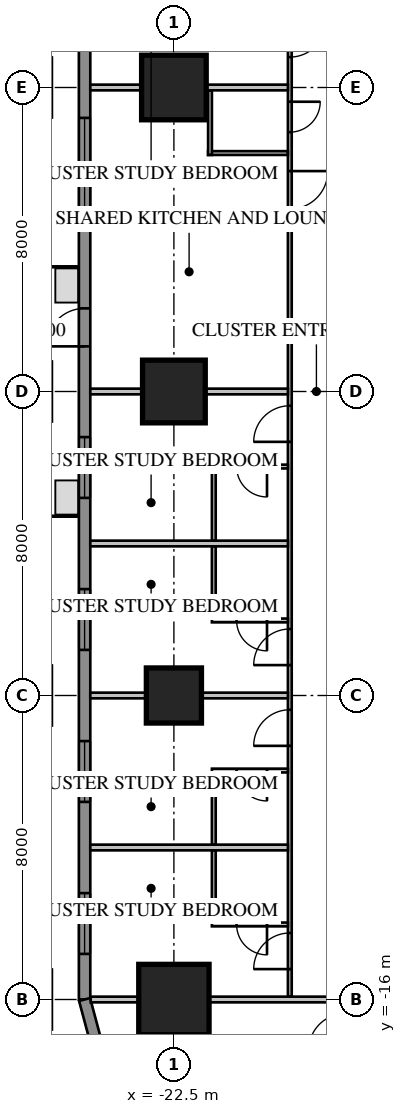
"""IFC4 building model, lengths in metres.
Left out: names, types, materials, properties, quantities, classifications, styles, units other than length and angle.
Written with IfcOpenShell. Run it as: python <this file> out.ifc"""

import sys

from ifc_helpers import new_model, si_unit, direction, frame, frame_2d, origin, origin_2d, place, context, subcontext, project, spatial, rectangle, extrude, element, fill, save


model = new_model("IFC4")
c1 = context("Model", 3, precision=1e-05, world=origin(), true_north=direction((0.0, 1.0)))
c2 = subcontext(c1, "Body", "Model", "MODEL_VIEW")
j1 = project(units=[si_unit("LENGTHUNIT", "METRE"), si_unit("PLANEANGLEUNIT", "RADIAN")], contexts=[c1])
p1 = place(None, origin())
s1 = spatial("IfcSite", under=j1, at=p1, CompositionType="ELEMENT")
p2 = place(p1, origin())
s2 = spatial("IfcBuilding", under=s1, at=p2, CompositionType="ELEMENT")
p3 = place(p2, frame((0.0, 0.0, 31.4)))
s3 = spatial("IfcBuildingStorey", under=s2, at=p3, CompositionType="ELEMENT", Elevation=31.4)
p4 = place(p3, frame((-22.5, 8.0, 0.0), z_axis=(0.0, 0.0, 1.0), x_axis=(1.0, 0.0, 0.0)))
e1 = element("IfcColumn", 1, at=p4, inside=s3, PredefinedType="COLUMN", context=c2, shape_type="SweptSolid", body=[
    extrude(rectangle(XDim=1.7, YDim=1.7, at=origin_2d()), origin(), (0.0, 0.0, 1.0), 3.85),
])
p5 = place(p3, frame((-22.5, 0.0, 0.0), z_axis=(0.0, 0.0, 1.0), x_axis=(1.0, 0.0, 0.0)))
e2 = element("IfcColumn", 2, at=p5, inside=s3, PredefinedType="COLUMN", context=c2, shape_type="SweptSolid", body=[
    extrude(rectangle(XDim=1.65, YDim=1.65, at=origin_2d()), origin(), (0.0, 0.0, 1.0), 3.85),
])
p6 = place(p3, frame((-22.5, -8.0, 0.0), z_axis=(0.0, 0.0, 1.0), x_axis=(1.0, 0.0, 0.0)))
e3 = element("IfcColumn", 3, at=p6, inside=s3, PredefinedType="COLUMN", context=c2, shape_type="SweptSolid", body=[
    extrude(rectangle(XDim=1.45, YDim=1.45, at=origin_2d()), origin(), (0.0, 0.0, 1.0), 3.85),
])
p7 = place(p3, frame((-22.5, -16.0, 0.0), z_axis=(0.0, 0.0, 1.0), x_axis=(1.0, 0.0, 0.0)))
e4 = element("IfcColumn", 4, at=p7, inside=s3, PredefinedType="COLUMN", context=c2, shape_type="SweptSolid", body=[
    extrude(rectangle(XDim=1.85, YDim=1.85, at=origin_2d()), origin(), (0.0, 0.0, 1.0), 3.85),
])
p8 = place(p3, frame((-24.85, 16.0, 0.0), z_axis=(0.0, 0.0, 1.0), x_axis=(0.0, -1.0, 0.0)))
e5 = element("IfcWall", 5, at=p8, inside=s3, PredefinedType="SOLIDWALL", context=c2, shape_type="SweptSolid", body=[
    extrude(rectangle(XDim=32.0, YDim=0.3, at=frame_2d((16.0, 0.0))), origin(), (0.0, 0.0, 1.0), 3.65),
])
p9 = place(p8, frame((1.2, 0.0, 0.75)))
e6 = element("IfcOpeningElement", 6, at=p9, cuts=e5, PredefinedType="OPENING", context=c2, shape_type="SweptSolid", body=[
    extrude(rectangle(XDim=1.6, YDim=1.8, at=frame_2d((0.8, 0.9))), frame((0.0, 0.17, 0.0), z_axis=(0.0, -1.0, 0.0), x_axis=(1.0, 0.0, 0.0)), (0.0, 0.0, 1.0), 0.34),
])
p10 = place(p8, frame((5.2, 0.0, 0.75)))
e7 = element("IfcOpeningElement", 7, at=p10, cuts=e5, PredefinedType="OPENING", context=c2, shape_type="SweptSolid", body=[
    extrude(rectangle(XDim=1.6, YDim=1.8, at=frame_2d((0.8, 0.9))), frame((0.0, 0.17, 0.0), z_axis=(0.0, -1.0, 0.0), x_axis=(1.0, 0.0, 0.0)), (0.0, 0.0, 1.0), 0.34),
])
p11 = place(p8, frame((17.2, 0.0, 0.75)))
e8 = element("IfcOpeningElement", 8, at=p11, cuts=e5, PredefinedType="OPENING", context=c2, shape_type="SweptSolid", body=[
    extrude(rectangle(XDim=1.6, YDim=1.8, at=frame_2d((0.8, 0.9))), frame((0.0, 0.17, 0.0), z_axis=(0.0, -1.0, 0.0), x_axis=(1.0, 0.0, 0.0)), (0.0, 0.0, 1.0), 0.34),
])
p12 = place(p8, frame((21.2, 0.0, 0.75)))
e9 = element("IfcOpeningElement", 9, at=p12, cuts=e5, PredefinedType="OPENING", context=c2, shape_type="SweptSolid", body=[
    extrude(rectangle(XDim=1.6, YDim=1.8, at=frame_2d((0.8, 0.9))), frame((0.0, 0.17, 0.0), z_axis=(0.0, -1.0, 0.0), x_axis=(1.0, 0.0, 0.0)), (0.0, 0.0, 1.0), 0.34),
])
p13 = place(p8, frame((25.2, 0.0, 0.75)))
e10 = element("IfcOpeningElement", 10, at=p13, cuts=e5, PredefinedType="OPENING", context=c2, shape_type="SweptSolid", body=[
    extrude(rectangle(XDim=1.6, YDim=1.8, at=frame_2d((0.8, 0.9))), frame((0.0, 0.17, 0.0), z_axis=(0.0, -1.0, 0.0), x_axis=(1.0, 0.0, 0.0)), (0.0, 0.0, 1.0), 0.34),
])
p14 = place(p8, frame((29.2, 0.0, 0.75)))
e11 = element("IfcOpeningElement", 11, at=p14, cuts=e5, PredefinedType="OPENING", context=c2, shape_type="SweptSolid", body=[
    extrude(rectangle(XDim=1.6, YDim=1.8, at=frame_2d((0.8, 0.9))), frame((0.0, 0.17, 0.0), z_axis=(0.0, -1.0, 0.0), x_axis=(1.0, 0.0, 0.0)), (0.0, 0.0, 1.0), 0.34),
])
p15 = place(p8, frame((8.8, 0.0, 0.75)))
e12 = element("IfcOpeningElement", 12, at=p15, cuts=e5, PredefinedType="OPENING", context=c2, shape_type="SweptSolid", body=[
    extrude(rectangle(XDim=2.4, YDim=1.8, at=frame_2d((1.2, 0.9))), frame((0.0, 0.17, 0.0), z_axis=(0.0, -1.0, 0.0), x_axis=(1.0, 0.0, 0.0)), (0.0, 0.0, 1.0), 0.34),
])
p16 = place(p8, frame((13.812, 0.0, 0.0)))
e13 = element("IfcOpeningElement", 13, at=p16, cuts=e5, PredefinedType="OPENING", context=c2, shape_type="SweptSolid", body=[
    extrude(rectangle(XDim=1.0, YDim=2.4, at=frame_2d((0.5, 1.2))), frame((0.0, 0.17, 0.0), z_axis=(0.0, -1.0, 0.0), x_axis=(1.0, 0.0, 0.0)), (0.0, 0.0, 1.0), 0.34),
])
p17 = place(p3, frame((-24.85, -16.0, 0.0), z_axis=(0.0, 0.0, 1.0), x_axis=(0.258839972501, -0.965920218567, 0.0)))
e14 = element("IfcWall", 14, at=p17, inside=s3, PredefinedType="SOLIDWALL", context=c2, shape_type="SweptSolid", body=[
    extrude(rectangle(XDim=4.581, YDim=0.3, at=frame_2d((2.291, 0.0))), origin(), (0.0, 0.0, 1.0), 3.65),
])
p18 = place(p3, frame((-19.45, 15.925, 0.0), z_axis=(0.0, 0.0, 1.0), x_axis=(0.0, -1.0, 0.0)))
e15 = element("IfcWall", 15, at=p18, inside=s3, PredefinedType="PARTITIONING", context=c2, shape_type="SweptSolid", body=[
    extrude(rectangle(XDim=31.85, YDim=0.1, at=frame_2d((15.925, 0.0))), origin(), (0.0, 0.0, 1.0), 3.65),
])
p19 = place(p18, frame((10.125, 0.0, 0.0)))
e16 = element("IfcOpeningElement", 16, at=p19, cuts=e15, PredefinedType="OPENING", context=c2, shape_type="SweptSolid", body=[
    extrude(rectangle(XDim=1.0, YDim=2.1, at=frame_2d((0.5, 1.05))), frame((0.0, 0.07, 0.0), z_axis=(0.0, -1.0, 0.0), x_axis=(1.0, 0.0, 0.0)), (0.0, 0.0, 1.0), 0.14),
])
p20 = place(p18, frame((8.3, 0.0, 0.0)))
e17 = element("IfcOpeningElement", 17, at=p20, cuts=e15, PredefinedType="OPENING", context=c2, shape_type="SweptSolid", body=[
    extrude(rectangle(XDim=0.8, YDim=2.1, at=frame_2d((0.4, 1.05))), frame((0.0, 0.07, 0.0), z_axis=(0.0, -1.0, 0.0), x_axis=(1.0, 0.0, 0.0)), (0.0, 0.0, 1.0), 0.14),
])
p21 = place(p18, frame((0.3, 0.0, 0.0)))
e18 = element("IfcOpeningElement", 18, at=p21, cuts=e15, PredefinedType="OPENING", context=c2, shape_type="SweptSolid", body=[
    extrude(rectangle(XDim=0.95, YDim=2.1, at=frame_2d((0.475, 1.05))), frame((0.0, 0.07, 0.0), z_axis=(0.0, -1.0, 0.0), x_axis=(1.0, 0.0, 0.0)), (0.0, 0.0, 1.0), 0.14),
])
p22 = place(p18, frame((6.175, 0.0, 0.0)))
e19 = element("IfcOpeningElement", 19, at=p22, cuts=e15, PredefinedType="OPENING", context=c2, shape_type="SweptSolid", body=[
    extrude(rectangle(XDim=0.95, YDim=2.1, at=frame_2d((0.475, 1.05))), frame((0.0, 0.07, 0.0), z_axis=(0.0, -1.0, 0.0), x_axis=(1.0, 0.0, 0.0)), (0.0, 0.0, 1.0), 0.14),
])
p23 = place(p18, frame((16.3, 0.0, 0.0)))
e20 = element("IfcOpeningElement", 20, at=p23, cuts=e15, PredefinedType="OPENING", context=c2, shape_type="SweptSolid", body=[
    extrude(rectangle(XDim=0.95, YDim=2.1, at=frame_2d((0.475, 1.05))), frame((0.0, 0.07, 0.0), z_axis=(0.0, -1.0, 0.0), x_axis=(1.0, 0.0, 0.0)), (0.0, 0.0, 1.0), 0.14),
])
p24 = place(p18, frame((22.175, 0.0, 0.0)))
e21 = element("IfcOpeningElement", 21, at=p24, cuts=e15, PredefinedType="OPENING", context=c2, shape_type="SweptSolid", body=[
    extrude(rectangle(XDim=0.95, YDim=2.1, at=frame_2d((0.475, 1.05))), frame((0.0, 0.07, 0.0), z_axis=(0.0, -1.0, 0.0), x_axis=(1.0, 0.0, 0.0)), (0.0, 0.0, 1.0), 0.14),
])
p25 = place(p18, frame((24.3, 0.0, 0.0)))
e22 = element("IfcOpeningElement", 22, at=p25, cuts=e15, PredefinedType="OPENING", context=c2, shape_type="SweptSolid", body=[
    extrude(rectangle(XDim=0.95, YDim=2.1, at=frame_2d((0.475, 1.05))), frame((0.0, 0.07, 0.0), z_axis=(0.0, -1.0, 0.0), x_axis=(1.0, 0.0, 0.0)), (0.0, 0.0, 1.0), 0.14),
])
p26 = place(p18, frame((30.175, 0.0, 0.0)))
e23 = element("IfcOpeningElement", 23, at=p26, cuts=e15, PredefinedType="OPENING", context=c2, shape_type="SweptSolid", body=[
    extrude(rectangle(XDim=0.95, YDim=2.1, at=frame_2d((0.475, 1.05))), frame((0.0, 0.07, 0.0), z_axis=(0.0, -1.0, 0.0), x_axis=(1.0, 0.0, 0.0)), (0.0, 0.0, 1.0), 0.14),
])
p27 = place(p3, frame((-19.5, 6.275, 0.0), z_axis=(0.0, 0.0, 1.0), x_axis=(-1.0, 0.0, 0.0)))
e24 = element("IfcWall", 24, at=p27, inside=s3, PredefinedType="PARTITIONING", context=c2, shape_type="SweptSolid", body=[
    extrude(rectangle(XDim=2.1, YDim=0.1, at=frame_2d((1.05, 0.0))), origin(), (0.0, 0.0, 1.0), 3.65),
])
p28 = place(p3, frame((-21.55, 7.925, 0.0), z_axis=(0.0, 0.0, 1.0), x_axis=(0.0, -1.0, 0.0)))
e25 = element("IfcWall", 25, at=p28, inside=s3, PredefinedType="PARTITIONING", context=c2, shape_type="SweptSolid", body=[
    extrude(rectangle(XDim=1.7, YDim=0.1, at=frame_2d((0.85, 0.0))), origin(), (0.0, 0.0, 1.0), 3.65),
])
p29 = place(p3, frame((-19.5, 8.0, 0.0), z_axis=(0.0, 0.0, 1.0), x_axis=(-1.0, 0.0, 0.0)))
e26 = element("IfcWall", 26, at=p29, inside=s3, PredefinedType="PARTITIONING", context=c2, shape_type="SweptSolid", body=[
    extrude(rectangle(XDim=5.2, YDim=0.15, at=frame_2d((2.6, 0.0))), origin(), (0.0, 0.0, 1.0), 3.65),
])
p30 = place(p3, frame((-19.5, 0.0, 0.0), z_axis=(0.0, 0.0, 1.0), x_axis=(-1.0, 0.0, 0.0)))
e27 = element("IfcWall", 27, at=p30, inside=s3, PredefinedType="PARTITIONING", context=c2, shape_type="SweptSolid", body=[
    extrude(rectangle(XDim=5.2, YDim=0.15, at=frame_2d((2.6, 0.0))), origin(), (0.0, 0.0, 1.0), 2.957),
])
for number, where, z_axis, x_axis in (
    (28, (-19.5, -4.0, 0.0), (0.0, 0.0, 1.0), (-1.0, 0.0, 0.0)),
    (29, (-19.5, -8.0, 0.0), (0.0, 0.0, 1.0), (-1.0, 0.0, 0.0)),
    (30, (-19.5, -12.0, 0.0), (0.0, 0.0, 1.0), (-1.0, 0.0, 0.0)),
):
    element("IfcWall", number, at=place(p3, frame(where, z_axis=z_axis, x_axis=x_axis)), inside=s3, PredefinedType="PARTITIONING", context=c2, shape_type="SweptSolid", body=[
        extrude(rectangle(XDim=5.2, YDim=0.15, at=frame_2d((2.6, 0.0))), origin(), (0.0, 0.0, 1.0), 3.65),
    ])
p31 = place(p3, frame((-18.1, -16.0, 0.0), z_axis=(0.0, 0.0, 1.0), x_axis=(-1.0, 0.0, 0.0)))
e31 = element("IfcWall", 31, at=p31, inside=s3, PredefinedType="PARTITIONING", context=c2, shape_type="SweptSolid", body=[
    extrude(rectangle(XDim=6.589, YDim=0.15, at=frame_2d((3.295, 0.0))), origin(), (0.0, 0.0, 1.0), 3.65),
])
p32 = place(p3, frame((-19.5, -1.975, 0.0), z_axis=(0.0, 0.0, 1.0), x_axis=(-1.0, 0.0, 0.0)))
e32 = element("IfcWall", 32, at=p32, inside=s3, PredefinedType="PARTITIONING", context=c2, shape_type="SweptSolid", body=[
    extrude(rectangle(XDim=2.0, YDim=0.1, at=frame_2d((1.0, 0.0))), origin(), (0.0, 0.0, 1.0), 3.65),
])
p33 = place(p32, frame((0.55, 0.0, 0.0)))
e33 = element("IfcOpeningElement", 33, at=p33, cuts=e32, PredefinedType="OPENING", context=c2, shape_type="SweptSolid", body=[
    extrude(rectangle(XDim=0.8, YDim=2.1, at=frame_2d((0.4, 1.05))), frame((0.0, 0.07, 0.0), z_axis=(0.0, -1.0, 0.0), x_axis=(1.0, 0.0, 0.0)), (0.0, 0.0, 1.0), 0.14),
])
p34 = place(p3, frame((-21.45, -2.025, 0.0), z_axis=(0.0, 0.0, 1.0), x_axis=(0.0, -1.0, 0.0)))
e34 = element("IfcWall", 34, at=p34, inside=s3, PredefinedType="PARTITIONING", context=c2, shape_type="SweptSolid", body=[
    extrude(rectangle(XDim=1.9, YDim=0.1, at=frame_2d((0.95, 0.0))), origin(), (0.0, 0.0, 1.0), 3.65),
])
p35 = place(p3, frame((-19.5, -6.025, 0.0), z_axis=(0.0, 0.0, 1.0), x_axis=(-1.0, 0.0, 0.0)))
e35 = element("IfcWall", 35, at=p35, inside=s3, PredefinedType="PARTITIONING", context=c2, shape_type="SweptSolid", body=[
    extrude(rectangle(XDim=2.0, YDim=0.1, at=frame_2d((1.0, 0.0))), origin(), (0.0, 0.0, 1.0), 3.65),
])
p36 = place(p35, frame((0.55, 0.0, 0.0)))
e36 = element("IfcOpeningElement", 36, at=p36, cuts=e35, PredefinedType="OPENING", context=c2, shape_type="SweptSolid", body=[
    extrude(rectangle(XDim=0.8, YDim=2.1, at=frame_2d((0.4, 1.05))), frame((0.0, 0.07, 0.0), z_axis=(0.0, -1.0, 0.0), x_axis=(1.0, 0.0, 0.0)), (0.0, 0.0, 1.0), 0.14),
])
p37 = place(p3, frame((-21.45, -4.075, 0.0), z_axis=(0.0, 0.0, 1.0), x_axis=(0.0, -1.0, 0.0)))
e37 = element("IfcWall", 37, at=p37, inside=s3, PredefinedType="PARTITIONING", context=c2, shape_type="SweptSolid", body=[
    extrude(rectangle(XDim=1.9, YDim=0.1, at=frame_2d((0.95, 0.0))), origin(), (0.0, 0.0, 1.0), 3.65),
])
p38 = place(p3, frame((-19.5, -9.975, 0.0), z_axis=(0.0, 0.0, 1.0), x_axis=(-1.0, 0.0, 0.0)))
e38 = element("IfcWall", 38, at=p38, inside=s3, PredefinedType="PARTITIONING", context=c2, shape_type="SweptSolid", body=[
    extrude(rectangle(XDim=2.0, YDim=0.1, at=frame_2d((1.0, 0.0))), origin(), (0.0, 0.0, 1.0), 3.65),
])
p39 = place(p38, frame((0.55, 0.0, 0.0)))
e39 = element("IfcOpeningElement", 39, at=p39, cuts=e38, PredefinedType="OPENING", context=c2, shape_type="SweptSolid", body=[
    extrude(rectangle(XDim=0.8, YDim=2.1, at=frame_2d((0.4, 1.05))), frame((0.0, 0.07, 0.0), z_axis=(0.0, -1.0, 0.0), x_axis=(1.0, 0.0, 0.0)), (0.0, 0.0, 1.0), 0.14),
])
p40 = place(p3, frame((-21.45, -10.025, 0.0), z_axis=(0.0, 0.0, 1.0), x_axis=(0.0, -1.0, 0.0)))
e40 = element("IfcWall", 40, at=p40, inside=s3, PredefinedType="PARTITIONING", context=c2, shape_type="SweptSolid", body=[
    extrude(rectangle(XDim=1.9, YDim=0.1, at=frame_2d((0.95, 0.0))), origin(), (0.0, 0.0, 1.0), 3.65),
])
p41 = place(p3, frame((-19.5, -14.025, 0.0), z_axis=(0.0, 0.0, 1.0), x_axis=(-1.0, 0.0, 0.0)))
e41 = element("IfcWall", 41, at=p41, inside=s3, PredefinedType="PARTITIONING", context=c2, shape_type="SweptSolid", body=[
    extrude(rectangle(XDim=2.0, YDim=0.1, at=frame_2d((1.0, 0.0))), origin(), (0.0, 0.0, 1.0), 3.65),
])
p42 = place(p41, frame((0.55, 0.0, 0.0)))
e42 = element("IfcOpeningElement", 42, at=p42, cuts=e41, PredefinedType="OPENING", context=c2, shape_type="SweptSolid", body=[
    extrude(rectangle(XDim=0.8, YDim=2.1, at=frame_2d((0.4, 1.05))), frame((0.0, 0.07, 0.0), z_axis=(0.0, -1.0, 0.0), x_axis=(1.0, 0.0, 0.0)), (0.0, 0.0, 1.0), 0.14),
])
p43 = place(p3, frame((-21.45, -12.075, 0.0), z_axis=(0.0, 0.0, 1.0), x_axis=(0.0, -1.0, 0.0)))
e43 = element("IfcWall", 43, at=p43, inside=s3, PredefinedType="PARTITIONING", context=c2, shape_type="SweptSolid", body=[
    extrude(rectangle(XDim=1.9, YDim=0.1, at=frame_2d((0.95, 0.0))), origin(), (0.0, 0.0, 1.0), 3.65),
])
p44 = place(p11, origin())
e44 = element("IfcWindow", 44, at=p44, inside=s3, PartitioningType="SINGLE_PANEL", PredefinedType="WINDOW", context=c2, shape_type="SweptSolid", body=[
    extrude(rectangle(XDim=1.6, YDim=1.8, at=frame_2d((0.8, 0.9))), frame((0.0, 0.03, 0.0), z_axis=(0.0, -1.0, 0.0), x_axis=(1.0, 0.0, 0.0)), (0.0, 0.0, 1.0), 0.06),
])
fill(e8, e44)
p45 = place(p12, origin())
e45 = element("IfcWindow", 45, at=p45, inside=s3, PartitioningType="SINGLE_PANEL", PredefinedType="WINDOW", context=c2, shape_type="SweptSolid", body=[
    extrude(rectangle(XDim=1.6, YDim=1.8, at=frame_2d((0.8, 0.9))), frame((0.0, 0.03, 0.0), z_axis=(0.0, -1.0, 0.0), x_axis=(1.0, 0.0, 0.0)), (0.0, 0.0, 1.0), 0.06),
])
fill(e9, e45)
p46 = place(p13, origin())
e46 = element("IfcWindow", 46, at=p46, inside=s3, PartitioningType="SINGLE_PANEL", PredefinedType="WINDOW", context=c2, shape_type="SweptSolid", body=[
    extrude(rectangle(XDim=1.6, YDim=1.8, at=frame_2d((0.8, 0.9))), frame((0.0, 0.03, 0.0), z_axis=(0.0, -1.0, 0.0), x_axis=(1.0, 0.0, 0.0)), (0.0, 0.0, 1.0), 0.06),
])
fill(e10, e46)
p47 = place(p14, origin())
e47 = element("IfcWindow", 47, at=p47, inside=s3, PartitioningType="SINGLE_PANEL", PredefinedType="WINDOW", context=c2, shape_type="SweptSolid", body=[
    extrude(rectangle(XDim=1.6, YDim=1.8, at=frame_2d((0.8, 0.9))), frame((0.0, 0.03, 0.0), z_axis=(0.0, -1.0, 0.0), x_axis=(1.0, 0.0, 0.0)), (0.0, 0.0, 1.0), 0.06),
])
fill(e11, e47)
p48 = place(p15, origin())
e48 = element("IfcWindow", 48, at=p48, inside=s3, PartitioningType="SINGLE_PANEL", PredefinedType="WINDOW", context=c2, shape_type="SweptSolid", body=[
    extrude(rectangle(XDim=2.4, YDim=1.8, at=frame_2d((1.2, 0.9))), frame((0.0, 0.03, 0.0), z_axis=(0.0, -1.0, 0.0), x_axis=(1.0, 0.0, 0.0)), (0.0, 0.0, 1.0), 0.06),
])
fill(e12, e48)
p49 = place(p16, origin())
e49 = element("IfcDoor", 49, at=p49, inside=s3, OperationType="SINGLE_SWING_RIGHT", PredefinedType="DOOR", context=c2, shape_type="SweptSolid", body=[
    extrude(rectangle(XDim=1.0, YDim=2.4, at=frame_2d((0.5, 1.2))), frame((0.0, 0.025, 0.0), z_axis=(0.0, -1.0, 0.0), x_axis=(1.0, 0.0, 0.0)), (0.0, 0.0, 1.0), 0.05),
])
fill(e13, e49)
p50 = place(p19, origin())
e50 = element("IfcDoor", 50, at=p50, inside=s3, OperationType="SINGLE_SWING_LEFT", PredefinedType="DOOR", context=c2, shape_type="SweptSolid", body=[
    extrude(rectangle(XDim=1.0, YDim=2.1, at=frame_2d((0.5, 1.05))), frame((0.0, 0.025, 0.0), z_axis=(0.0, -1.0, 0.0), x_axis=(1.0, 0.0, 0.0)), (0.0, 0.0, 1.0), 0.05),
])
fill(e16, e50)
p51 = place(p20, origin())
e51 = element("IfcDoor", 51, at=p51, inside=s3, OperationType="SINGLE_SWING_LEFT", PredefinedType="DOOR", context=c2, shape_type="SweptSolid", body=[
    extrude(rectangle(XDim=0.8, YDim=2.1, at=frame_2d((0.4, 1.05))), frame((0.0, 0.025, 0.0), z_axis=(0.0, -1.0, 0.0), x_axis=(1.0, 0.0, 0.0)), (0.0, 0.0, 1.0), 0.05),
])
fill(e17, e51)
p52 = place(p22, origin())
e52 = element("IfcDoor", 52, at=p52, inside=s3, OperationType="SINGLE_SWING_LEFT", PredefinedType="DOOR", context=c2, shape_type="SweptSolid", body=[
    extrude(rectangle(XDim=0.95, YDim=2.1, at=frame_2d((0.475, 1.05))), frame((0.0, 0.025, 0.0), z_axis=(0.0, -1.0, 0.0), x_axis=(1.0, 0.0, 0.0)), (0.0, 0.0, 1.0), 0.05),
])
fill(e19, e52)
p53 = place(p23, origin())
e53 = element("IfcDoor", 53, at=p53, inside=s3, OperationType="SINGLE_SWING_RIGHT", PredefinedType="DOOR", context=c2, shape_type="SweptSolid", body=[
    extrude(rectangle(XDim=0.95, YDim=2.1, at=frame_2d((0.475, 1.05))), frame((0.0, 0.025, 0.0), z_axis=(0.0, -1.0, 0.0), x_axis=(1.0, 0.0, 0.0)), (0.0, 0.0, 1.0), 0.05),
])
fill(e20, e53)
p54 = place(p33, origin())
e54 = element("IfcDoor", 54, at=p54, inside=s3, OperationType="SINGLE_SWING_LEFT", PredefinedType="DOOR", context=c2, shape_type="SweptSolid", body=[
    extrude(rectangle(XDim=0.8, YDim=2.1, at=frame_2d((0.4, 1.05))), frame((0.0, 0.025, 0.0), z_axis=(0.0, -1.0, 0.0), x_axis=(1.0, 0.0, 0.0)), (0.0, 0.0, 1.0), 0.05),
])
fill(e33, e54)
p55 = place(p24, origin())
e55 = element("IfcDoor", 55, at=p55, inside=s3, OperationType="SINGLE_SWING_RIGHT", PredefinedType="DOOR", context=c2, shape_type="SweptSolid", body=[
    extrude(rectangle(XDim=0.95, YDim=2.1, at=frame_2d((0.475, 1.05))), frame((0.0, 0.025, 0.0), z_axis=(0.0, -1.0, 0.0), x_axis=(1.0, 0.0, 0.0)), (0.0, 0.0, 1.0), 0.05),
])
fill(e21, e55)
p56 = place(p36, origin())
e56 = element("IfcDoor", 56, at=p56, inside=s3, OperationType="SINGLE_SWING_LEFT", PredefinedType="DOOR", context=c2, shape_type="SweptSolid", body=[
    extrude(rectangle(XDim=0.8, YDim=2.1, at=frame_2d((0.4, 1.05))), frame((0.0, 0.025, 0.0), z_axis=(0.0, -1.0, 0.0), x_axis=(1.0, 0.0, 0.0)), (0.0, 0.0, 1.0), 0.05),
])
fill(e36, e56)
p57 = place(p25, origin())
e57 = element("IfcDoor", 57, at=p57, inside=s3, OperationType="SINGLE_SWING_RIGHT", PredefinedType="DOOR", context=c2, shape_type="SweptSolid", body=[
    extrude(rectangle(XDim=0.95, YDim=2.1, at=frame_2d((0.475, 1.05))), frame((0.0, 0.025, 0.0), z_axis=(0.0, -1.0, 0.0), x_axis=(1.0, 0.0, 0.0)), (0.0, 0.0, 1.0), 0.05),
])
fill(e22, e57)
p58 = place(p39, origin())
e58 = element("IfcDoor", 58, at=p58, inside=s3, OperationType="SINGLE_SWING_LEFT", PredefinedType="DOOR", context=c2, shape_type="SweptSolid", body=[
    extrude(rectangle(XDim=0.8, YDim=2.1, at=frame_2d((0.4, 1.05))), frame((0.0, 0.025, 0.0), z_axis=(0.0, -1.0, 0.0), x_axis=(1.0, 0.0, 0.0)), (0.0, 0.0, 1.0), 0.05),
])
fill(e39, e58)
p59 = place(p26, origin())
e59 = element("IfcDoor", 59, at=p59, inside=s3, OperationType="SINGLE_SWING_RIGHT", PredefinedType="DOOR", context=c2, shape_type="SweptSolid", body=[
    extrude(rectangle(XDim=0.95, YDim=2.1, at=frame_2d((0.475, 1.05))), frame((0.0, 0.025, 0.0), z_axis=(0.0, -1.0, 0.0), x_axis=(1.0, 0.0, 0.0)), (0.0, 0.0, 1.0), 0.05),
])
fill(e23, e59)
p60 = place(p42, origin())
e60 = element("IfcDoor", 60, at=p60, inside=s3, OperationType="SINGLE_SWING_LEFT", PredefinedType="DOOR", context=c2, shape_type="SweptSolid", body=[
    extrude(rectangle(XDim=0.8, YDim=2.1, at=frame_2d((0.4, 1.05))), frame((0.0, 0.025, 0.0), z_axis=(0.0, -1.0, 0.0), x_axis=(1.0, 0.0, 0.0)), (0.0, 0.0, 1.0), 0.05),
])
fill(e42, e60)
save(model, sys.argv[1])
